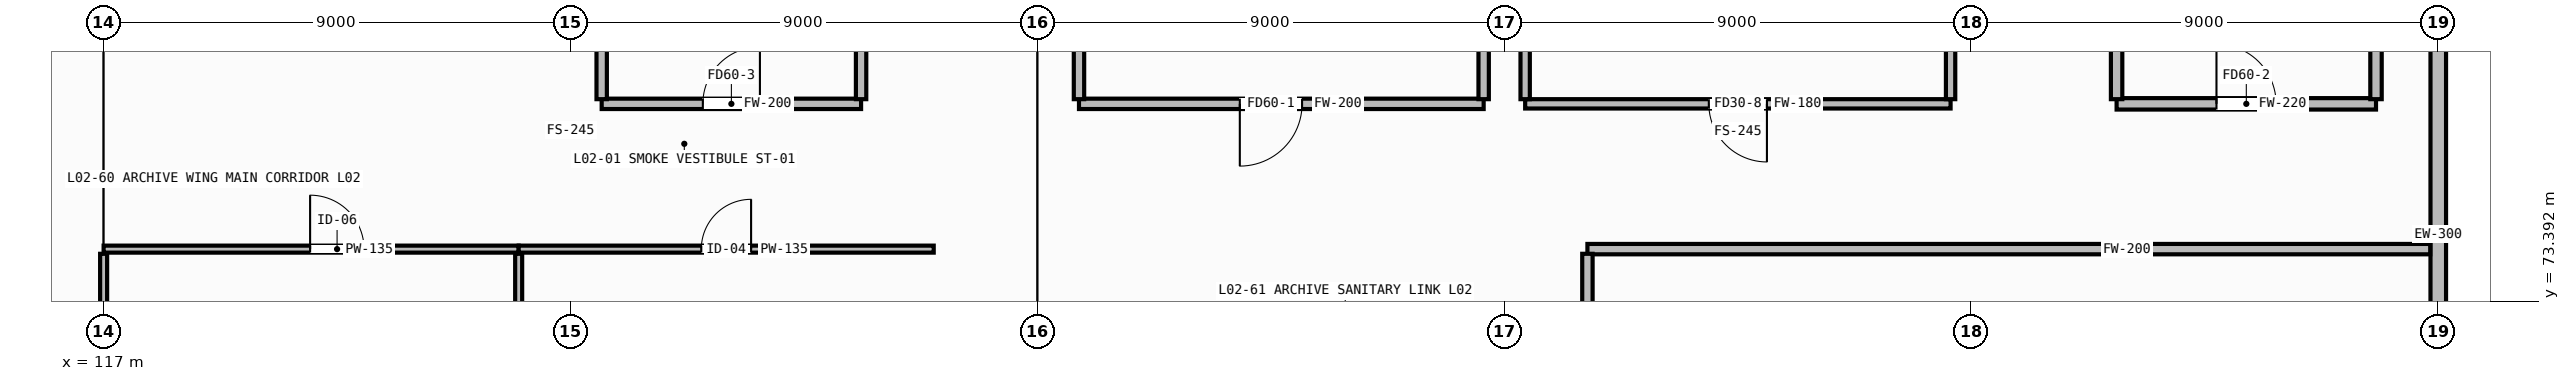
"""IFC4 building model, lengths in metres.
Left out: names, types, materials, properties, quantities, classifications, styles, units other than length and angle.
Written with IfcOpenShell. Run it as: python <this file> out.ifc"""

import sys

from ifc_helpers import new_model, si_unit, direction, frame, frame_2d, origin, place, context, subcontext, project, spatial, rectangle, extrude, element, fill, save


model = new_model("IFC4")
c1 = context("Model", 3, precision=1e-05, world=origin(), true_north=direction((0.0, 1.0)))
c2 = subcontext(c1, "Body", "Model", "MODEL_VIEW")
j1 = project(units=[si_unit("LENGTHUNIT", "METRE"), si_unit("PLANEANGLEUNIT", "RADIAN")], contexts=[c1])
p1 = place(None, origin())
s1 = spatial("IfcSite", under=j1, at=p1, CompositionType="ELEMENT")
p2 = place(p1, origin())
s2 = spatial("IfcBuilding", under=s1, at=p2, CompositionType="ELEMENT")
p3 = place(p2, frame((0.0, 0.0, 4.8)))
s3 = spatial("IfcBuildingStorey", under=s2, at=p3, CompositionType="ELEMENT", Elevation=4.8)
p4 = place(p3, frame((162.0, 78.85, 0.0), z_axis=(0.0, 0.0, 1.0), x_axis=(0.0, -1.0, 0.0)))
e1 = element("IfcWall", 1, at=p4, inside=s3, PredefinedType="STANDARD", context=c2, shape_type="SweptSolid", body=[
    extrude(rectangle(XDim=6.5, YDim=0.3, at=frame_2d((3.25, 0.0))), origin(), (0.0, 0.0, 1.0), 3.255),
])
p5 = place(p3, frame((126.6, 77.2, 0.0), z_axis=(0.0, 0.0, 1.0), x_axis=(1.0, 0.0, 0.0)))
e2 = element("IfcWall", 2, at=p5, inside=s3, PredefinedType="PARTITIONING", context=c2, shape_type="SweptSolid", body=[
    extrude(rectangle(XDim=5.0, YDim=0.2, at=frame_2d((2.5, 0.0))), origin(), (0.0, 0.0, 1.0), 3.755),
])
p6 = place(p5, frame((1.95, 0.0, 0.0)))
e3 = element("IfcOpeningElement", 3, at=p6, cuts=e2, PredefinedType="OPENING", context=c2, shape_type="SweptSolid", body=[
    extrude(rectangle(XDim=1.1, YDim=2.08, at=frame_2d((0.55, 1.04))), frame((0.0, 0.112, 0.0), z_axis=(0.0, -1.0, 0.0), x_axis=(1.0, 0.0, 0.0)), (0.0, 0.0, 1.0), 0.224),
])
for number, where, z_axis, x_axis in (
    (4, (126.6, 77.29, 0.0), (0.0, 0.0, 1.0), (0.0, 1.0, 0.0)),
    (5, (131.6, 77.29, 0.0), (0.0, 0.0, 1.0), (0.0, 1.0, 0.0)),
):
    element("IfcWall", number, at=place(p3, frame(where, z_axis=z_axis, x_axis=x_axis)), inside=s3, PredefinedType="PARTITIONING", context=c2, shape_type="SweptSolid", body=[
        extrude(rectangle(XDim=3.82, YDim=0.2, at=frame_2d((1.91, 0.0))), origin(), (0.0, 0.0, 1.0), 3.755),
    ])
p7 = place(p3, frame((155.8, 77.2, 0.0), z_axis=(0.0, 0.0, 1.0), x_axis=(1.0, 0.0, 0.0)))
e6 = element("IfcWall", 6, at=p7, inside=s3, PredefinedType="PARTITIONING", context=c2, shape_type="SweptSolid", body=[
    extrude(rectangle(XDim=5.0, YDim=0.22, at=frame_2d((2.5, 0.0))), origin(), (0.0, 0.0, 1.0), 3.755),
])
p8 = place(p7, frame((1.925, 0.0, 0.0)))
e7 = element("IfcOpeningElement", 7, at=p8, cuts=e6, PredefinedType="OPENING", context=c2, shape_type="SweptSolid", body=[
    extrude(rectangle(XDim=1.15, YDim=2.1, at=frame_2d((0.575, 1.05))), frame((0.0, 0.122, 0.0), z_axis=(0.0, -1.0, 0.0), x_axis=(1.0, 0.0, 0.0)), (0.0, 0.0, 1.0), 0.244),
])
for number, where, z_axis, x_axis in (
    (8, (155.8, 77.29, 0.0), (0.0, 0.0, 1.0), (0.0, 1.0, 0.0)),
    (9, (160.8, 77.29, 0.0), (0.0, 0.0, 1.0), (0.0, 1.0, 0.0)),
):
    element("IfcWall", number, at=place(p3, frame(where, z_axis=z_axis, x_axis=x_axis)), inside=s3, PredefinedType="PARTITIONING", context=c2, shape_type="SweptSolid", body=[
        extrude(rectangle(XDim=3.82, YDim=0.22, at=frame_2d((1.91, 0.0))), origin(), (0.0, 0.0, 1.0), 3.755),
    ])
p9 = place(p3, frame((135.8, 77.2, 0.0), z_axis=(0.0, 0.0, 1.0), x_axis=(1.0, 0.0, 0.0)))
e10 = element("IfcWall", 10, at=p9, inside=s3, PredefinedType="PARTITIONING", context=c2, shape_type="SweptSolid", body=[
    extrude(rectangle(XDim=7.8, YDim=0.2, at=frame_2d((3.9, 0.0))), origin(), (0.0, 0.0, 1.0), 3.755),
])
p10 = place(p9, frame((3.1, 0.0, 0.0)))
e11 = element("IfcOpeningElement", 11, at=p10, cuts=e10, PredefinedType="OPENING", context=c2, shape_type="SweptSolid", body=[
    extrude(rectangle(XDim=1.2, YDim=2.1, at=frame_2d((0.6, 1.05))), frame((0.0, 0.112, 0.0), z_axis=(0.0, -1.0, 0.0), x_axis=(1.0, 0.0, 0.0)), (0.0, 0.0, 1.0), 0.224),
])
for number, where, z_axis, x_axis in (
    (12, (135.8, 77.29, 0.0), (0.0, 0.0, 1.0), (0.0, 1.0, 0.0)),
    (13, (143.6, 77.29, 0.0), (0.0, 0.0, 1.0), (0.0, 1.0, 0.0)),
):
    element("IfcWall", number, at=place(p3, frame(where, z_axis=z_axis, x_axis=x_axis)), inside=s3, PredefinedType="PARTITIONING", context=c2, shape_type="SweptSolid", body=[
        extrude(rectangle(XDim=3.82, YDim=0.2, at=frame_2d((1.91, 0.0))), origin(), (0.0, 0.0, 1.0), 3.755),
    ])
p11 = place(p3, frame((144.4, 77.2, 0.0), z_axis=(0.0, 0.0, 1.0), x_axis=(1.0, 0.0, 0.0)))
e14 = element("IfcWall", 14, at=p11, inside=s3, PredefinedType="PARTITIONING", context=c2, shape_type="SweptSolid", body=[
    extrude(rectangle(XDim=8.2, YDim=0.18, at=frame_2d((4.1, 0.0))), origin(), (0.0, 0.0, 1.0), 3.755),
])
p12 = place(p11, frame((3.54, 0.0, 0.0)))
e15 = element("IfcOpeningElement", 15, at=p12, cuts=e14, PredefinedType="OPENING", context=c2, shape_type="SweptSolid", body=[
    extrude(rectangle(XDim=1.12, YDim=2.08, at=frame_2d((0.56, 1.04))), frame((0.0, 0.102, 0.0), z_axis=(0.0, -1.0, 0.0), x_axis=(1.0, 0.0, 0.0)), (0.0, 0.0, 1.0), 0.204),
])
for number, where, z_axis, x_axis in (
    (16, (144.4, 77.29, 0.0), (0.0, 0.0, 1.0), (0.0, 1.0, 0.0)),
    (17, (152.6, 77.29, 0.0), (0.0, 0.0, 1.0), (0.0, 1.0, 0.0)),
):
    element("IfcWall", number, at=place(p3, frame(where, z_axis=z_axis, x_axis=x_axis)), inside=s3, PredefinedType="PARTITIONING", context=c2, shape_type="SweptSolid", body=[
        extrude(rectangle(XDim=3.82, YDim=0.18, at=frame_2d((1.91, 0.0))), origin(), (0.0, 0.0, 1.0), 3.755),
    ])
p13 = place(p3, frame((117.0, 74.4, 0.0), z_axis=(0.0, 0.0, 1.0), x_axis=(1.0, 0.0, 0.0)))
e18 = element("IfcWall", 18, at=p13, inside=s3, PredefinedType="PARTITIONING", context=c2, shape_type="SweptSolid", body=[
    extrude(rectangle(XDim=8.0, YDim=0.135, at=frame_2d((4.0, 0.0))), origin(), (0.0, 0.0, 1.0), 3.755),
])
p14 = place(p13, frame((3.98, 0.0, 0.0)))
e19 = element("IfcOpeningElement", 19, at=p14, cuts=e18, PredefinedType="OPENING", context=c2, shape_type="SweptSolid", body=[
    extrude(rectangle(XDim=1.04, YDim=2.08, at=frame_2d((0.52, 1.04))), frame((0.0, 0.08, 0.0), z_axis=(0.0, -1.0, 0.0), x_axis=(1.0, 0.0, 0.0)), (0.0, 0.0, 1.0), 0.159),
])
p15 = place(p3, frame((117.0, 65.49, 0.0), z_axis=(0.0, 0.0, 1.0), x_axis=(0.0, 1.0, 0.0)))
e20 = element("IfcWall", 20, at=p15, inside=s3, PredefinedType="PARTITIONING", context=c2, shape_type="SweptSolid", body=[
    extrude(rectangle(XDim=8.82, YDim=0.135, at=frame_2d((4.41, 0.0))), origin(), (0.0, 0.0, 1.0), 3.035),
])
p16 = place(p3, frame((125.0, 65.49, 0.0), z_axis=(0.0, 0.0, 1.0), x_axis=(0.0, 1.0, 0.0)))
e21 = element("IfcWall", 21, at=p16, inside=s3, PredefinedType="PARTITIONING", context=c2, shape_type="SweptSolid", body=[
    extrude(rectangle(XDim=8.82, YDim=0.135, at=frame_2d((4.41, 0.0))), origin(), (0.0, 0.0, 1.0), 3.755),
])
p17 = place(p3, frame((125.0, 74.4, 0.0), z_axis=(0.0, 0.0, 1.0), x_axis=(1.0, 0.0, 0.0)))
e22 = element("IfcWall", 22, at=p17, inside=s3, PredefinedType="PARTITIONING", context=c2, shape_type="SweptSolid", body=[
    extrude(rectangle(XDim=8.0, YDim=0.135, at=frame_2d((4.0, 0.0))), origin(), (0.0, 0.0, 1.0), 3.755),
])
p18 = place(p17, frame((3.52, 0.0, 0.0)))
e23 = element("IfcOpeningElement", 23, at=p18, cuts=e22, PredefinedType="OPENING", context=c2, shape_type="SweptSolid", body=[
    extrude(rectangle(XDim=0.96, YDim=2.1, at=frame_2d((0.48, 1.05))), frame((0.0, 0.08, 0.0), z_axis=(0.0, -1.0, 0.0), x_axis=(1.0, 0.0, 0.0)), (0.0, 0.0, 1.0), 0.159),
])
p19 = place(p3, frame((145.6, 74.4, 0.0), z_axis=(0.0, 0.0, 1.0), x_axis=(1.0, 0.0, 0.0)))
e24 = element("IfcWall", 24, at=p19, inside=s3, PredefinedType="PARTITIONING", context=c2, shape_type="SweptSolid", body=[
    extrude(rectangle(XDim=16.245, YDim=0.2, at=frame_2d((8.123, 0.0))), origin(), (0.0, 0.0, 1.0), 3.755),
])
p20 = place(p3, frame((145.6, 43.235, 0.0), z_axis=(0.0, 0.0, 1.0), x_axis=(0.0, 1.0, 0.0)))
e25 = element("IfcWall", 25, at=p20, inside=s3, PredefinedType="PARTITIONING", context=c2, shape_type="SweptSolid", body=[
    extrude(rectangle(XDim=31.075, YDim=0.2, at=frame_2d((15.538, 0.0))), origin(), (0.0, 0.0, 1.0), 3.755),
])
p21 = place(p20, frame((17.29, 0.0, 0.0)))
e26 = element("IfcOpeningElement", 26, at=p21, cuts=e25, PredefinedType="OPENING", context=c2, shape_type="SweptSolid", body=[
    extrude(rectangle(XDim=1.35, YDim=2.08, at=frame_2d((0.675, 1.04))), frame((0.0, 0.112, 0.0), z_axis=(0.0, -1.0, 0.0), x_axis=(1.0, 0.0, 0.0)), (0.0, 0.0, 1.0), 0.224),
])
p22 = place(p6, origin())
e27 = element("IfcDoor", 27, at=p22, inside=s3, OperationType="SINGLE_SWING_RIGHT", PredefinedType="DOOR", context=c2, shape_type="SweptSolid", body=[
    extrude(rectangle(XDim=1.1, YDim=2.08, at=frame_2d((0.55, 1.04))), frame((0.0, 0.025, 0.0), z_axis=(0.0, -1.0, 0.0), x_axis=(1.0, 0.0, 0.0)), (0.0, 0.0, 1.0), 0.05),
])
fill(e3, e27)
p23 = place(p8, origin())
e28 = element("IfcDoor", 28, at=p23, inside=s3, OperationType="SINGLE_SWING_LEFT", PredefinedType="DOOR", context=c2, shape_type="SweptSolid", body=[
    extrude(rectangle(XDim=1.15, YDim=2.1, at=frame_2d((0.575, 1.05))), frame((0.0, 0.025, 0.0), z_axis=(0.0, -1.0, 0.0), x_axis=(1.0, 0.0, 0.0)), (0.0, 0.0, 1.0), 0.05),
])
fill(e7, e28)
p24 = place(p10, frame((1.2, 0.0, 0.0), z_axis=(0.0, 0.0, 1.0), x_axis=(-1.0, 0.0, 0.0)))
e29 = element("IfcDoor", 29, at=p24, inside=s3, OperationType="SINGLE_SWING_RIGHT", PredefinedType="DOOR", context=c2, shape_type="SweptSolid", body=[
    extrude(rectangle(XDim=1.2, YDim=2.1, at=frame_2d((0.6, 1.05))), frame((0.0, 0.025, 0.0), z_axis=(0.0, -1.0, 0.0), x_axis=(1.0, 0.0, 0.0)), (0.0, 0.0, 1.0), 0.05),
])
fill(e11, e29)
p25 = place(p12, frame((1.12, 0.0, 0.0), z_axis=(0.0, 0.0, 1.0), x_axis=(-1.0, 0.0, 0.0)))
e30 = element("IfcDoor", 30, at=p25, inside=s3, OperationType="SINGLE_SWING_LEFT", PredefinedType="DOOR", context=c2, shape_type="SweptSolid", body=[
    extrude(rectangle(XDim=1.12, YDim=2.08, at=frame_2d((0.56, 1.04))), frame((0.0, 0.025, 0.0), z_axis=(0.0, -1.0, 0.0), x_axis=(1.0, 0.0, 0.0)), (0.0, 0.0, 1.0), 0.05),
])
fill(e15, e30)
p26 = place(p14, origin())
e31 = element("IfcDoor", 31, at=p26, inside=s3, OperationType="SINGLE_SWING_LEFT", PredefinedType="DOOR", context=c2, shape_type="SweptSolid", body=[
    extrude(rectangle(XDim=1.04, YDim=2.08, at=frame_2d((0.52, 1.04))), frame((0.0, 0.025, 0.0), z_axis=(0.0, -1.0, 0.0), x_axis=(1.0, 0.0, 0.0)), (0.0, 0.0, 1.0), 0.05),
])
fill(e19, e31)
p27 = place(p18, origin())
e32 = element("IfcDoor", 32, at=p27, inside=s3, OperationType="SINGLE_SWING_RIGHT", PredefinedType="DOOR", context=c2, shape_type="SweptSolid", body=[
    extrude(rectangle(XDim=0.96, YDim=2.1, at=frame_2d((0.48, 1.05))), frame((0.0, 0.025, 0.0), z_axis=(0.0, -1.0, 0.0), x_axis=(1.0, 0.0, 0.0)), (0.0, 0.0, 1.0), 0.05),
])
fill(e23, e32)
save(model, sys.argv[1])
